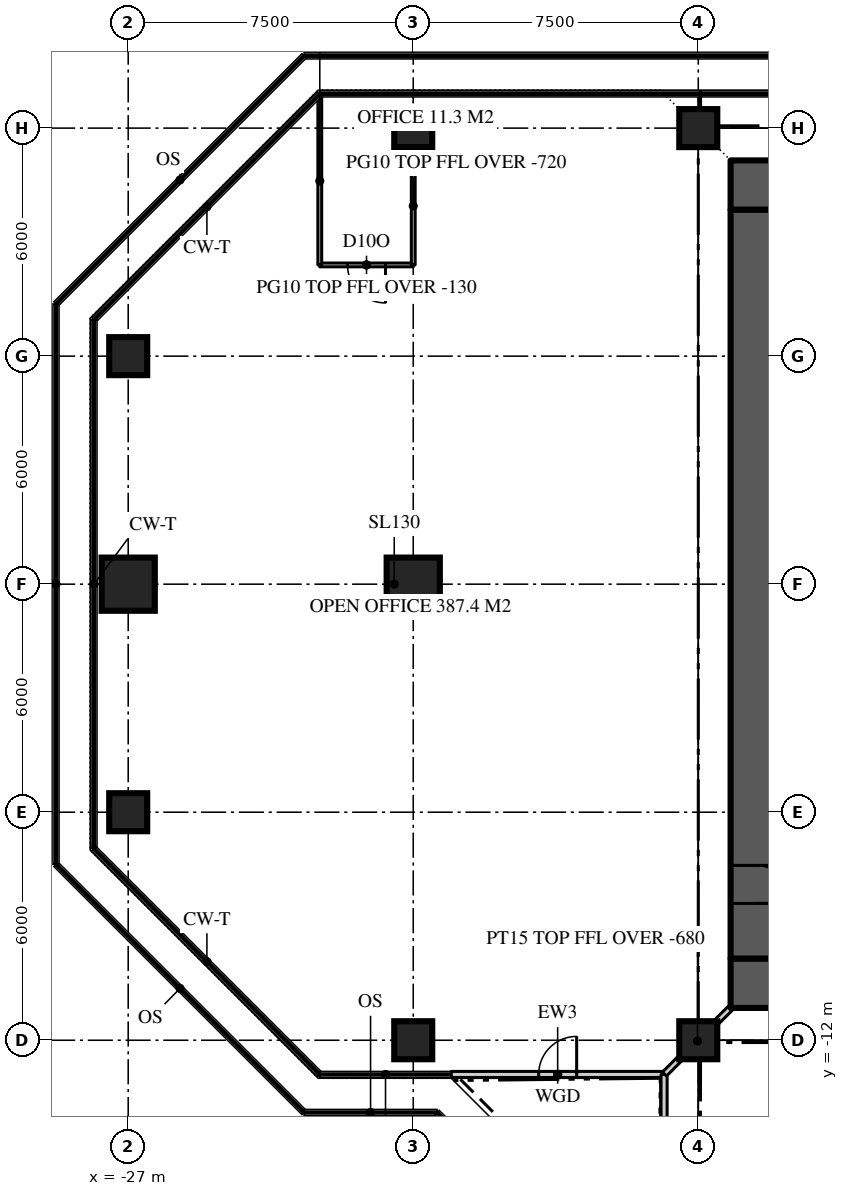
"""IFC4 building model, lengths in metres.
Left out: names, types, materials, properties, quantities, classifications, styles, units other than length and angle.
Written with IfcOpenShell. Run it as: python <this file> out.ifc"""

import sys

from ifc_helpers import new_model, si_unit, direction, frame, frame_2d, origin, origin_2d, place, context, subcontext, project, spatial, rectangle, extrude, element, fill, save


model = new_model("IFC4")
c1 = context("Model", 3, precision=1e-05, world=origin(), true_north=direction((0.0, 1.0)))
c2 = subcontext(c1, "Body", "Model", "MODEL_VIEW")
j1 = project(units=[si_unit("LENGTHUNIT", "METRE"), si_unit("PLANEANGLEUNIT", "RADIAN")], contexts=[c1])
p1 = place(None, origin())
s1 = spatial("IfcSite", under=j1, at=p1, CompositionType="ELEMENT")
p2 = place(p1, origin())
s2 = spatial("IfcBuilding", under=s1, at=p2, CompositionType="ELEMENT")
p3 = place(p2, frame((0.0, 0.0, 275.1)))
s3 = spatial("IfcBuildingStorey", under=s2, at=p3, CompositionType="ELEMENT", Elevation=275.1)
p4 = place(p3, frame((-11.15, 10.5, 0.0), z_axis=(0.0, 0.0, 1.0), x_axis=(1.0, 0.0, 0.0)))
e1 = element("IfcWall", 1, at=p4, inside=s3, PredefinedType="SHEAR", context=c2, shape_type="SweptSolid", body=[
    extrude(rectangle(XDim=22.3, YDim=1.3, at=frame_2d((11.15, 0.0))), origin(), (0.0, 0.0, 1.0), 3.9),
])
p5 = place(p4, frame((4.25, 0.0, 0.0)))
e2 = element("IfcOpeningElement", 2, at=p5, cuts=e1, PredefinedType="OPENING", context=c2, shape_type="SweptSolid", body=[
    extrude(rectangle(XDim=1.8, YDim=2.2, at=frame_2d((0.9, 1.1))), frame((0.0, 0.66, 0.0), z_axis=(0.0, -1.0, 0.0), x_axis=(1.0, 0.0, 0.0)), (0.0, 0.0, 1.0), 1.32),
])
p6 = place(p4, frame((16.25, 0.0, 0.0)))
e3 = element("IfcOpeningElement", 3, at=p6, cuts=e1, PredefinedType="OPENING", context=c2, shape_type="SweptSolid", body=[
    extrude(rectangle(XDim=1.8, YDim=2.2, at=frame_2d((0.9, 1.1))), frame((0.0, 0.66, 0.0), z_axis=(0.0, -1.0, 0.0), x_axis=(1.0, 0.0, 0.0)), (0.0, 0.0, 1.0), 1.32),
])
p7 = place(p3, frame((11.15, -10.5, 0.0), z_axis=(0.0, 0.0, 1.0), x_axis=(-1.0, 0.0, 0.0)))
e4 = element("IfcWall", 4, at=p7, inside=s3, PredefinedType="SHEAR", context=c2, shape_type="SweptSolid", body=[
    extrude(rectangle(XDim=22.3, YDim=1.3, at=frame_2d((11.15, 0.0))), origin(), (0.0, 0.0, 1.0), 3.9),
])
p8 = place(p7, frame((16.25, 0.0, 0.0)))
e5 = element("IfcOpeningElement", 5, at=p8, cuts=e4, PredefinedType="OPENING", context=c2, shape_type="SweptSolid", body=[
    extrude(rectangle(XDim=1.8, YDim=2.2, at=frame_2d((0.9, 1.1))), frame((0.0, 0.66, 0.0), z_axis=(0.0, -1.0, 0.0), x_axis=(1.0, 0.0, 0.0)), (0.0, 0.0, 1.0), 1.32),
])
p9 = place(p7, frame((4.25, 0.0, 0.0)))
e6 = element("IfcOpeningElement", 6, at=p9, cuts=e4, PredefinedType="OPENING", context=c2, shape_type="SweptSolid", body=[
    extrude(rectangle(XDim=1.8, YDim=2.2, at=frame_2d((0.9, 1.1))), frame((0.0, 0.66, 0.0), z_axis=(0.0, -1.0, 0.0), x_axis=(1.0, 0.0, 0.0)), (0.0, 0.0, 1.0), 1.32),
])
p10 = place(p3, frame((-10.5, 9.85, 0.0), z_axis=(0.0, 0.0, 1.0), x_axis=(0.0, -1.0, 0.0)))
e7 = element("IfcWall", 7, at=p10, inside=s3, PredefinedType="SHEAR", context=c2, shape_type="SweptSolid", body=[
    extrude(rectangle(XDim=19.7, YDim=1.3, at=frame_2d((9.85, 0.0))), origin(), (0.0, 0.0, 1.0), 3.9),
])
p11 = place(p10, frame((17.25, 0.0, 0.0)))
e8 = element("IfcOpeningElement", 8, at=p11, cuts=e7, PredefinedType="OPENING", context=c2, shape_type="SweptSolid", body=[
    extrude(rectangle(XDim=1.0, YDim=2.2, at=frame_2d((0.5, 1.1))), frame((0.0, 0.66, 0.0), z_axis=(0.0, -1.0, 0.0), x_axis=(1.0, 0.0, 0.0)), (0.0, 0.0, 1.0), 1.32),
])
for number, where, z_axis, x_axis in (
    (9, (-19.5, -12.0, 0.0), (0.0, 0.0, 1.0), (1.0, 0.0, 0.0)),
    (10, (-12.0, -12.0, 0.0), (0.0, 0.0, 1.0), (1.0, 0.0, 0.0)),
    (11, (-27.0, -6.0, 0.0), (0.0, 0.0, 1.0), (1.0, 0.0, 0.0)),
):
    element("IfcColumn", number, at=place(p3, frame(where, z_axis=z_axis, x_axis=x_axis)), inside=s3, PredefinedType="COLUMN", context=c2, shape_type="SweptSolid", body=[
        extrude(rectangle(XDim=1.0, YDim=1.0, at=origin_2d()), origin(), (0.0, 0.0, 1.0), 3.9),
    ])
for number, where, z_axis, x_axis in (
    (12, (-27.0, 0.0, 0.0), (0.0, 0.0, 1.0), (1.0, 0.0, 0.0)),
    (13, (-19.5, 0.0, 0.0), (0.0, 0.0, 1.0), (1.0, 0.0, 0.0)),
):
    element("IfcColumn", number, at=place(p3, frame(where, z_axis=z_axis, x_axis=x_axis)), inside=s3, PredefinedType="COLUMN", context=c2, shape_type="SweptSolid", body=[
        extrude(rectangle(XDim=1.4, YDim=1.4, at=origin_2d()), origin(), (0.0, 0.0, 1.0), 3.9),
    ])
for number, where, z_axis, x_axis in (
    (14, (-27.0, 6.0, 0.0), (0.0, 0.0, 1.0), (1.0, 0.0, 0.0)),
    (15, (-19.5, 12.0, 0.0), (0.0, 0.0, 1.0), (1.0, 0.0, 0.0)),
    (16, (-12.0, 12.0, 0.0), (0.0, 0.0, 1.0), (1.0, 0.0, 0.0)),
):
    element("IfcColumn", number, at=place(p3, frame(where, z_axis=z_axis, x_axis=x_axis)), inside=s3, PredefinedType="COLUMN", context=c2, shape_type="SweptSolid", body=[
        extrude(rectangle(XDim=1.0, YDim=1.0, at=origin_2d()), origin(), (0.0, 0.0, 1.0), 3.9),
    ])
p12 = place(p3, frame((-18.5, -12.9, 0.0), z_axis=(0.0, 0.0, 1.0), x_axis=(1.0, 0.0, 0.0)))
e17 = element("IfcWall", 17, at=p12, inside=s3, PredefinedType="SOLIDWALL", context=c2, shape_type="SweptSolid", body=[
    extrude(rectangle(XDim=5.6, YDim=0.16, at=frame_2d((2.8, 0.0))), origin(), (0.0, 0.0, 1.0), 3.77),
])
p13 = place(p12, frame((2.3, 0.0, 0.0)))
e18 = element("IfcOpeningElement", 18, at=p13, cuts=e17, PredefinedType="OPENING", context=c2, shape_type="SweptSolid", body=[
    extrude(rectangle(XDim=1.0, YDim=2.2, at=frame_2d((0.5, 1.1))), frame((0.0, 0.09, 0.0), z_axis=(0.0, -1.0, 0.0), x_axis=(1.0, 0.0, 0.0)), (0.0, 0.0, 1.0), 0.18),
])
p14 = place(p3, frame((-12.9, -12.9, 0.0), z_axis=(0.0, 0.0, 1.0), x_axis=(0.0, -1.0, 0.0)))
e19 = element("IfcWall", 19, at=p14, inside=s3, PredefinedType="SOLIDWALL", context=c2, shape_type="SweptSolid", body=[
    extrude(rectangle(XDim=5.6, YDim=0.16, at=frame_2d((2.8, 0.0))), origin(), (0.0, 0.0, 1.0), 3.77),
])
p15 = place(p3, frame((-19.5, 8.4, 0.0), z_axis=(0.0, 0.0, 1.0), x_axis=(-1.0, 0.0, 0.0)))
e20 = element("IfcWall", 20, at=p15, inside=s3, PredefinedType="PARTITIONING", context=c2, shape_type="SweptSolid", body=[
    extrude(rectangle(XDim=2.459, YDim=0.1, at=frame_2d((1.229, 0.0))), origin(), (0.0, 0.0, 1.0), 3.77),
])
p16 = place(p15, frame((0.729, 0.0, 0.0)))
e21 = element("IfcOpeningElement", 21, at=p16, cuts=e20, PredefinedType="OPENING", context=c2, shape_type="SweptSolid", body=[
    extrude(rectangle(XDim=1.0, YDim=2.2, at=frame_2d((0.5, 1.1))), frame((0.0, 0.06, 0.0), z_axis=(0.0, -1.0, 0.0), x_axis=(1.0, 0.0, 0.0)), (0.0, 0.0, 1.0), 0.12),
])
p17 = place(p3, frame((-19.5, 8.4, 0.0), z_axis=(0.0, 0.0, 1.0), x_axis=(0.0, 1.0, 0.0)))
e22 = element("IfcWall", 22, at=p17, inside=s3, PredefinedType="PARTITIONING", context=c2, shape_type="SweptSolid", body=[
    extrude(rectangle(XDim=3.1, YDim=0.1, at=frame_2d((1.55, 0.0))), origin(), (0.0, 0.0, 1.0), 3.18),
])
p18 = place(p3, frame((-21.959, 8.4, 0.0), z_axis=(0.0, 0.0, 1.0), x_axis=(0.0, 1.0, 0.0)))
e23 = element("IfcWall", 23, at=p18, inside=s3, PredefinedType="PARTITIONING", context=c2, shape_type="SweptSolid", body=[
    extrude(rectangle(XDim=4.42, YDim=0.1, at=frame_2d((2.21, 0.0))), origin(), (0.0, 0.0, 1.0), 3.77),
])
p19 = place(p3, frame((-11.15, -11.15, 0.0), z_axis=(0.0, 0.0, 1.0), x_axis=(-0.707106781187, -0.707106781187, 0.0)))
e24 = element("IfcWall", 24, at=p19, inside=s3, PredefinedType="PARTITIONING", context=c2, shape_type="SweptSolid", body=[
    extrude(rectangle(XDim=2.461, YDim=0.15, at=frame_2d((1.23, 0.0))), origin(), (0.0, 0.0, 1.0), 3.22),
])
p20 = place(p13, origin())
e25 = element("IfcDoor", 25, at=p20, inside=s3, OperationType="SINGLE_SWING_RIGHT", PredefinedType="DOOR", context=c2, shape_type="SweptSolid", body=[
    extrude(rectangle(XDim=1.0, YDim=2.2, at=frame_2d((0.5, 1.1))), frame((0.0, 0.025, 0.0), z_axis=(0.0, -1.0, 0.0), x_axis=(1.0, 0.0, 0.0)), (0.0, 0.0, 1.0), 0.05),
])
fill(e18, e25)
p21 = place(p11, origin())
e26 = element("IfcDoor", 26, at=p21, inside=s3, OperationType="SINGLE_SWING_RIGHT", PredefinedType="DOOR", context=c2, shape_type="SweptSolid", body=[
    extrude(rectangle(XDim=1.0, YDim=2.2, at=frame_2d((0.5, 1.1))), frame((0.0, 0.025, 0.0), z_axis=(0.0, -1.0, 0.0), x_axis=(1.0, 0.0, 0.0)), (0.0, 0.0, 1.0), 0.05),
])
fill(e8, e26)
p22 = place(p16, origin())
e27 = element("IfcDoor", 27, at=p22, inside=s3, OperationType="SINGLE_SWING_LEFT", PredefinedType="DOOR", context=c2, shape_type="SweptSolid", body=[
    extrude(rectangle(XDim=1.0, YDim=2.2, at=frame_2d((0.5, 1.1))), frame((0.0, 0.025, 0.0), z_axis=(0.0, -1.0, 0.0), x_axis=(1.0, 0.0, 0.0)), (0.0, 0.0, 1.0), 0.05),
])
fill(e21, e27)
save(model, sys.argv[1])
